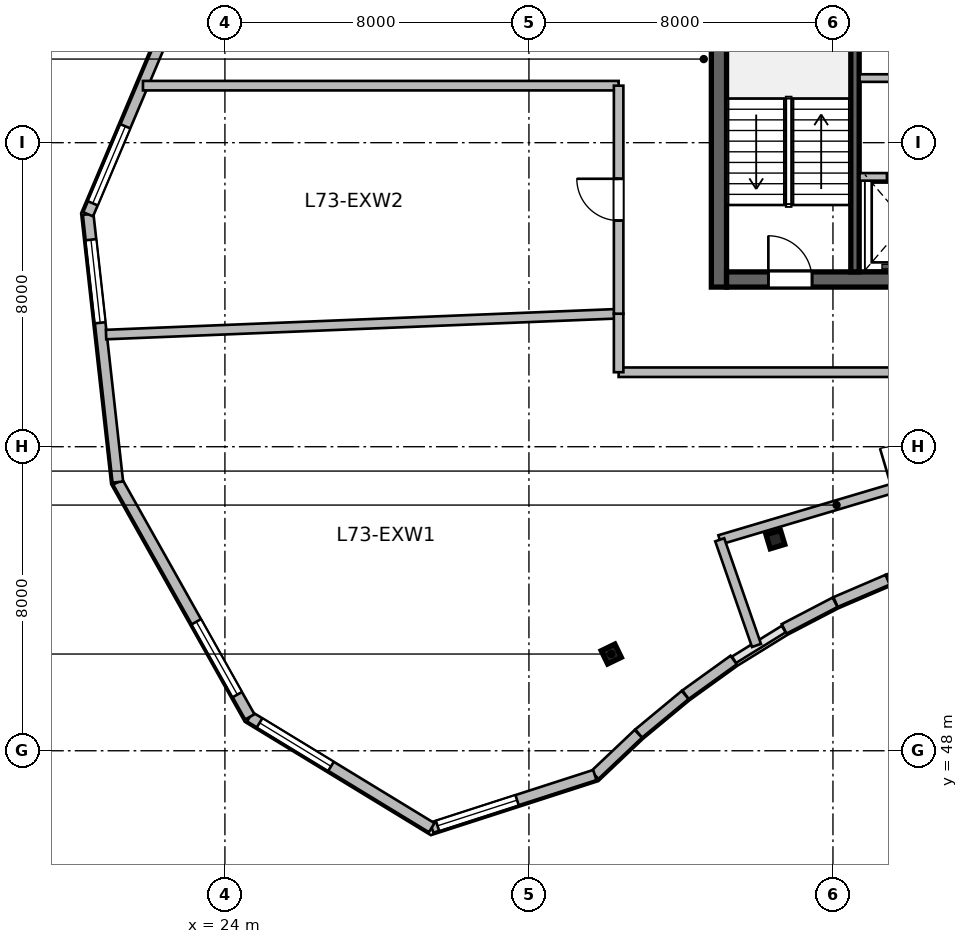
"""IFC4 building model, lengths in metres.
Left out: names, types, materials, properties, quantities, classifications, styles, units other than length and angle.
Written with IfcOpenShell. Run it as: python <this file> out.ifc"""

import sys

from ifc_helpers import new_model, si_unit, direction, frame, frame_2d, origin, origin_2d, place, context, subcontext, project, spatial, rectangle, i_section, extrude, source, transform, mapped, element, fill, save


model = new_model("IFC4")
c1 = context("Model", 3, precision=1e-05, world=origin(), true_north=direction((0.0, 1.0)))
c2 = subcontext(c1, "Body", "Model", "MODEL_VIEW")
j1 = project(units=[si_unit("LENGTHUNIT", "METRE"), si_unit("PLANEANGLEUNIT", "RADIAN")], contexts=[c1])
p1 = place(None, origin())
s1 = spatial("IfcSite", under=j1, at=p1, CompositionType="ELEMENT")
p2 = place(p1, origin())
s2 = spatial("IfcBuilding", under=s1, at=p2, CompositionType="ELEMENT")
p3 = place(p2, frame((0.0, 0.0, 299.1)))
s3 = spatial("IfcBuildingStorey", under=s2, at=p3, CompositionType="ELEMENT", Elevation=299.1)
m1 = source(origin(), c2, "Body", "SweptSolid", [
    extrude(rectangle(XDim=12.0, YDim=0.4, at=frame_2d((6.0, 0.0))), origin(), (0.0, 0.0, 1.0), 3.9),
])
p4 = place(p3, frame((37.0, 60.2, 0.0), z_axis=(0.0, 0.0, 1.0), x_axis=(0.0, 1.0, 0.0)))
e1 = element("IfcWall", 1, at=p4, inside=s3, PredefinedType="SHEAR", context=c2, shape_type="MappedRepresentation", body=[
    mapped(m1, transform((0.0, 0.0, 0.0), scale=1.0)),
])
m2 = source(origin(), c2, "Body", "SweptSolid", [
    extrude(rectangle(XDim=21.6, YDim=0.4, at=frame_2d((10.8, 0.0))), origin(), (0.0, 0.0, 1.0), 3.9),
])
p5 = place(p3, frame((37.2, 60.4, 0.0), z_axis=(0.0, 0.0, 1.0), x_axis=(1.0, 0.0, 0.0)))
e2 = element("IfcWall", 2, at=p5, inside=s3, PredefinedType="SHEAR", context=c2, shape_type="MappedRepresentation", body=[
    mapped(m2, transform((0.0, 0.0, 0.0), scale=1.0)),
])
p6 = place(p5, frame((1.1, 0.0, 0.0)))
e3 = element("IfcOpeningElement", 3, at=p6, cuts=e2, PredefinedType="OPENING", context=c2, shape_type="SweptSolid", body=[
    extrude(rectangle(XDim=1.15, YDim=2.15, at=frame_2d((0.575, 1.075))), frame((0.0, 0.21, 0.0), z_axis=(0.0, -1.0, 0.0), x_axis=(1.0, 0.0, 0.0)), (0.0, 0.0, 1.0), 0.42),
])
p7 = place(p5, frame((19.5, 0.0, 0.0)))
e4 = element("IfcOpeningElement", 4, at=p7, cuts=e2, PredefinedType="OPENING", context=c2, shape_type="SweptSolid", body=[
    extrude(rectangle(XDim=0.9, YDim=2.1, at=frame_2d((0.45, 1.05))), frame((0.0, 0.21, 0.0), z_axis=(0.0, -1.0, 0.0), x_axis=(1.0, 0.0, 0.0)), (0.0, 0.0, 1.0), 0.42),
])
p8 = place(p5, frame((12.02, 0.0, 0.0)))
e5 = element("IfcOpeningElement", 5, at=p8, cuts=e2, PredefinedType="OPENING", context=c2, shape_type="SweptSolid", body=[
    extrude(rectangle(XDim=1.6, YDim=2.15, at=frame_2d((0.8, 1.075))), frame((0.0, 0.21, 0.0), z_axis=(0.0, -1.0, 0.0), x_axis=(1.0, 0.0, 0.0)), (0.0, 0.0, 1.0), 0.42),
])
m3 = source(origin(), c2, "Body", "SweptSolid", [
    extrude(rectangle(XDim=11.2, YDim=0.22, at=frame_2d((5.6, 0.0))), origin(), (0.0, 0.0, 1.0), 3.9),
])
p9 = place(p3, frame((40.58, 60.6, 0.0), z_axis=(0.0, 0.0, 1.0), x_axis=(0.0, 1.0, 0.0)))
e6 = element("IfcWall", 6, at=p9, inside=s3, PredefinedType="SHEAR", context=c2, shape_type="MappedRepresentation", body=[
    mapped(m3, transform((0.0, 0.0, 0.0), scale=1.0)),
])
m4 = source(origin(), c2, "Body", "SweptSolid", [
    extrude(i_section(OverallWidth=0.399, OverallDepth=0.387, WebThickness=0.021, FlangeThickness=0.033, at=origin_2d()), origin(), (0.0, 0.0, 1.0), 3.9),
])
for number, where, z_axis, x_axis in (
    (7, (34.166, 50.545, 0.0), (0.0, 0.0, 1.0), (-0.436, 0.9, 0.0)),
    (8, (38.485, 53.558, 0.0), (0.0, 0.0, 1.0), (-0.289, 0.957, 0.0)),
):
    element("IfcColumn", number, at=place(p3, frame(where, z_axis=z_axis, x_axis=x_axis)), inside=s3, PredefinedType="COLUMN", context=c2, shape_type="MappedRepresentation", body=[
        mapped(m4, transform((0.0, 0.0, 0.0), scale=1.0)),
    ])
m5 = source(origin(), c2, "Body", "SweptSolid", [
    extrude(rectangle(XDim=1.473, YDim=0.28, at=frame_2d((0.736, 0.0))), origin(), (0.0, 0.0, 1.0), 3.64),
])
p10 = place(p3, frame((42.845, 52.979, 0.0), z_axis=(0.0, 0.0, 1.0), x_axis=(-0.946641296917, -0.322289086026, 0.0)))
e9 = element("IfcWall", 9, at=p10, inside=s3, PredefinedType="SOLIDWALL", context=c2, shape_type="MappedRepresentation", body=[
    mapped(m5, transform((0.0, 0.0, 0.0), scale=1.0)),
])
m6 = source(origin(), c2, "Body", "SweptSolid", [
    extrude(rectangle(XDim=1.49, YDim=0.28, at=frame_2d((0.745, 0.0))), origin(), (0.0, 0.0, 1.0), 3.64),
])
p11 = place(p3, frame((41.438, 52.5, 0.0), z_axis=(0.0, 0.0, 1.0), x_axis=(-0.919009427656, -0.394235553799, 0.0)))
e10 = element("IfcWall", 10, at=p11, inside=s3, PredefinedType="SOLIDWALL", context=c2, shape_type="MappedRepresentation", body=[
    mapped(m6, transform((0.0, 0.0, 0.0), scale=1.0)),
])
m7 = source(origin(), c2, "Body", "SweptSolid", [
    extrude(rectangle(XDim=1.512, YDim=0.28, at=frame_2d((0.756, 0.0))), origin(), (0.0, 0.0, 1.0), 3.64),
])
p12 = place(p3, frame((40.056, 51.906, 0.0), z_axis=(0.0, 0.0, 1.0), x_axis=(-0.886841011195, -0.462074691865, 0.0)))
e11 = element("IfcWall", 11, at=p12, inside=s3, PredefinedType="SOLIDWALL", context=c2, shape_type="MappedRepresentation", body=[
    mapped(m7, transform((0.0, 0.0, 0.0), scale=1.0)),
])
m8 = source(origin(), c2, "Body", "SweptSolid", [
    extrude(rectangle(XDim=1.561, YDim=0.28, at=frame_2d((0.781, 0.0))), origin(), (0.0, 0.0, 1.0), 3.64),
])
p13 = place(p3, frame((37.387, 50.387, 0.0), z_axis=(0.0, 0.0, 1.0), x_axis=(-0.81154027425, -0.584296485758, 0.0)))
e12 = element("IfcWall", 12, at=p13, inside=s3, PredefinedType="SOLIDWALL", context=c2, shape_type="MappedRepresentation", body=[
    mapped(m8, transform((0.0, 0.0, 0.0), scale=1.0)),
])
m9 = source(origin(), c2, "Body", "SweptSolid", [
    extrude(rectangle(XDim=1.589, YDim=0.28, at=frame_2d((0.794, 0.0))), origin(), (0.0, 0.0, 1.0), 3.64),
])
p14 = place(p3, frame((36.11, 49.468, 0.0), z_axis=(0.0, 0.0, 1.0), x_axis=(-0.769805836273, -0.63827813251, 0.0)))
e13 = element("IfcWall", 13, at=p14, inside=s3, PredefinedType="SOLIDWALL", context=c2, shape_type="MappedRepresentation", body=[
    mapped(m9, transform((0.0, 0.0, 0.0), scale=1.0)),
])
m10 = source(origin(), c2, "Body", "SweptSolid", [
    extrude(rectangle(XDim=1.577, YDim=0.28, at=frame_2d((0.789, 0.0))), origin(), (0.0, 0.0, 1.0), 3.64),
])
p15 = place(p3, frame((34.878, 48.446, 0.0), z_axis=(0.0, 0.0, 1.0), x_axis=(-0.726119464467, -0.687568558998, 0.0)))
e14 = element("IfcWall", 14, at=p15, inside=s3, PredefinedType="SOLIDWALL", context=c2, shape_type="MappedRepresentation", body=[
    mapped(m10, transform((0.0, 0.0, 0.0), scale=1.0)),
])
m11 = source(origin(), c2, "Body", "SweptSolid", [
    extrude(rectangle(XDim=4.509, YDim=0.28, at=frame_2d((2.255, 0.0))), origin(), (0.0, 0.0, 1.0), 3.64),
])
p16 = place(p3, frame((33.733, 47.361, 0.0), z_axis=(0.0, 0.0, 1.0), x_axis=(-0.95162949292, -0.307247958828, 0.0)))
e15 = element("IfcWall", 15, at=p16, inside=s3, PredefinedType="SOLIDWALL", context=c2, shape_type="MappedRepresentation", body=[
    mapped(m11, transform((0.0, 0.0, 0.0), scale=1.0)),
])
p17 = place(p16, frame((2.149, 0.0, 0.95)))
e16 = element("IfcOpeningElement", 16, at=p17, cuts=e15, PredefinedType="OPENING", context=c2, shape_type="SweptSolid", body=[
    extrude(rectangle(XDim=2.2, YDim=2.1, at=frame_2d((1.1, 1.05))), frame((0.0, 0.15, 0.0), z_axis=(0.0, -1.0, 0.0), x_axis=(1.0, 0.0, 0.0)), (0.0, 0.0, 1.0), 0.3),
])
m12 = source(origin(), c2, "Body", "SweptSolid", [
    extrude(rectangle(XDim=5.604, YDim=0.28, at=frame_2d((2.802, 0.0))), origin(), (0.0, 0.0, 1.0), 3.64),
])
p18 = place(p3, frame((29.442, 45.976, 0.0), z_axis=(0.0, 0.0, 1.0), x_axis=(-0.854002492971, 0.520268913158, 0.0)))
e17 = element("IfcWall", 17, at=p18, inside=s3, PredefinedType="SOLIDWALL", context=c2, shape_type="MappedRepresentation", body=[
    mapped(m12, transform((0.0, 0.0, 0.0), scale=1.0)),
])
p19 = place(p18, frame((3.103, 0.0, 0.95)))
e18 = element("IfcOpeningElement", 18, at=p19, cuts=e17, PredefinedType="OPENING", context=c2, shape_type="SweptSolid", body=[
    extrude(rectangle(XDim=2.2, YDim=2.1, at=frame_2d((1.1, 1.05))), frame((0.0, 0.15, 0.0), z_axis=(0.0, -1.0, 0.0), x_axis=(1.0, 0.0, 0.0)), (0.0, 0.0, 1.0), 0.3),
])
m13 = source(origin(), c2, "Body", "SweptSolid", [
    extrude(rectangle(XDim=7.087, YDim=0.28, at=frame_2d((3.543, 0.0))), origin(), (0.0, 0.0, 1.0), 3.64),
])
p20 = place(p3, frame((24.656, 48.892, 0.0), z_axis=(0.0, 0.0, 1.0), x_axis=(-0.490158199368, 0.871633489256, 0.0)))
e19 = element("IfcWall", 19, at=p20, inside=s3, PredefinedType="SOLIDWALL", context=c2, shape_type="MappedRepresentation", body=[
    mapped(m13, transform((0.0, 0.0, 0.0), scale=1.0)),
])
p21 = place(p20, frame((0.672, 0.0, 0.95)))
e20 = element("IfcOpeningElement", 20, at=p21, cuts=e19, PredefinedType="OPENING", context=c2, shape_type="SweptSolid", body=[
    extrude(rectangle(XDim=2.2, YDim=2.1, at=frame_2d((1.1, 1.05))), frame((0.0, 0.15, 0.0), z_axis=(0.0, -1.0, 0.0), x_axis=(1.0, 0.0, 0.0)), (0.0, 0.0, 1.0), 0.3),
])
m14 = source(origin(), c2, "Body", "SweptSolid", [
    extrude(rectangle(XDim=7.09, YDim=0.28, at=frame_2d((3.545, 0.0))), origin(), (0.0, 0.0, 1.0), 3.64),
])
p22 = place(p3, frame((21.182, 55.069, 0.0), z_axis=(0.0, 0.0, 1.0), x_axis=(-0.110159396922, 0.993913933532, 0.0)))
e21 = element("IfcWall", 21, at=p22, inside=s3, PredefinedType="SOLIDWALL", context=c2, shape_type="MappedRepresentation", body=[
    mapped(m14, transform((0.0, 0.0, 0.0), scale=1.0)),
])
p23 = place(p22, frame((4.217, 0.0, 0.95)))
e22 = element("IfcOpeningElement", 22, at=p23, cuts=e21, PredefinedType="OPENING", context=c2, shape_type="SweptSolid", body=[
    extrude(rectangle(XDim=2.2, YDim=2.1, at=frame_2d((1.1, 1.05))), frame((0.0, 0.15, 0.0), z_axis=(0.0, -1.0, 0.0), x_axis=(1.0, 0.0, 0.0)), (0.0, 0.0, 1.0), 0.3),
])
m15 = source(origin(), c2, "Body", "SweptSolid", [
    extrude(rectangle(XDim=5.655, YDim=0.28, at=frame_2d((2.828, 0.0))), origin(), (0.0, 0.0, 1.0), 3.64),
])
p24 = place(p3, frame((20.401, 62.116, 0.0), z_axis=(0.0, 0.0, 1.0), x_axis=(0.389585063528, 0.920990487614, 0.0)))
e23 = element("IfcWall", 23, at=p24, inside=s3, PredefinedType="SOLIDWALL", context=c2, shape_type="MappedRepresentation", body=[
    mapped(m15, transform((0.0, 0.0, 0.0), scale=1.0)),
])
p25 = place(p24, frame((0.314, 0.0, 0.95)))
e24 = element("IfcOpeningElement", 24, at=p25, cuts=e23, PredefinedType="OPENING", context=c2, shape_type="SweptSolid", body=[
    extrude(rectangle(XDim=2.2, YDim=2.1, at=frame_2d((1.1, 1.05))), frame((0.0, 0.15, 0.0), z_axis=(0.0, -1.0, 0.0), x_axis=(1.0, 0.0, 0.0)), (0.0, 0.0, 1.0), 0.3),
])
m16 = source(origin(), c2, "Body", "SweptSolid", [
    extrude(rectangle(XDim=8.02, YDim=0.2, at=frame_2d((4.01, 0.0))), origin(), (0.0, 0.0, 1.0), 3.64),
])
p26 = place(p3, frame((40.7, 63.1, 0.0), z_axis=(0.0, 0.0, 1.0), x_axis=(1.0, 0.0, 0.0)))
e25 = element("IfcWall", 25, at=p26, inside=s3, PredefinedType="SOLIDWALL", context=c2, shape_type="MappedRepresentation", body=[
    mapped(m16, transform((0.0, 0.0, 0.0), scale=1.0)),
])
p27 = place(p26, frame((0.72, 0.0, 0.0)))
e26 = element("IfcOpeningElement", 26, at=p27, cuts=e25, PredefinedType="OPENING", context=c2, shape_type="SweptSolid", body=[
    extrude(rectangle(XDim=1.0, YDim=2.15, at=frame_2d((0.5, 1.075))), frame((0.0, 0.11, 0.0), z_axis=(0.0, -1.0, 0.0), x_axis=(1.0, 0.0, 0.0)), (0.0, 0.0, 1.0), 0.22),
])
p28 = place(p26, frame((2.62, 0.0, 0.0)))
e27 = element("IfcOpeningElement", 27, at=p28, cuts=e25, PredefinedType="OPENING", context=c2, shape_type="SweptSolid", body=[
    extrude(rectangle(XDim=1.0, YDim=2.15, at=frame_2d((0.5, 1.075))), frame((0.0, 0.11, 0.0), z_axis=(0.0, -1.0, 0.0), x_axis=(1.0, 0.0, 0.0)), (0.0, 0.0, 1.0), 0.22),
])
p29 = place(p26, frame((4.55, 0.0, 0.0)))
e28 = element("IfcOpeningElement", 28, at=p29, cuts=e25, PredefinedType="OPENING", context=c2, shape_type="SweptSolid", body=[
    extrude(rectangle(XDim=1.0, YDim=2.15, at=frame_2d((0.5, 1.075))), frame((0.0, 0.11, 0.0), z_axis=(0.0, -1.0, 0.0), x_axis=(1.0, 0.0, 0.0)), (0.0, 0.0, 1.0), 0.22),
])
p30 = place(p26, frame((6.55, 0.0, 0.0)))
e29 = element("IfcOpeningElement", 29, at=p30, cuts=e25, PredefinedType="OPENING", context=c2, shape_type="SweptSolid", body=[
    extrude(rectangle(XDim=1.0, YDim=2.15, at=frame_2d((0.5, 1.075))), frame((0.0, 0.11, 0.0), z_axis=(0.0, -1.0, 0.0), x_axis=(1.0, 0.0, 0.0)), (0.0, 0.0, 1.0), 0.22),
])
m17 = source(origin(), c2, "Body", "SweptSolid", [
    extrude(rectangle(XDim=8.8, YDim=0.2, at=frame_2d((4.4, 0.0))), origin(), (0.0, 0.0, 1.0), 3.64),
])
p31 = place(p3, frame((40.7, 65.7, 0.0), z_axis=(0.0, 0.0, 1.0), x_axis=(1.0, 0.0, 0.0)))
e30 = element("IfcWall", 30, at=p31, inside=s3, PredefinedType="SOLIDWALL", context=c2, shape_type="MappedRepresentation", body=[
    mapped(m17, transform((0.0, 0.0, 0.0), scale=1.0)),
])
p32 = place(p31, frame((1.6, 0.0, 0.0)))
e31 = element("IfcOpeningElement", 31, at=p32, cuts=e30, PredefinedType="OPENING", context=c2, shape_type="SweptSolid", body=[
    extrude(rectangle(XDim=0.9, YDim=2.1, at=frame_2d((0.45, 1.05))), frame((0.0, 0.11, 0.0), z_axis=(0.0, -1.0, 0.0), x_axis=(1.0, 0.0, 0.0)), (0.0, 0.0, 1.0), 0.22),
])
p33 = place(p31, frame((6.1, 0.0, 0.0)))
e32 = element("IfcOpeningElement", 32, at=p33, cuts=e30, PredefinedType="OPENING", context=c2, shape_type="SweptSolid", body=[
    extrude(rectangle(XDim=0.9, YDim=2.1, at=frame_2d((0.45, 1.05))), frame((0.0, 0.11, 0.0), z_axis=(0.0, -1.0, 0.0), x_axis=(1.0, 0.0, 0.0)), (0.0, 0.0, 1.0), 0.22),
])
m18 = source(origin(), c2, "Body", "SweptSolid", [
    extrude(rectangle(XDim=11.454, YDim=0.25, at=frame_2d((5.727, 0.0))), origin(), (0.0, 0.0, 1.0), 3.314),
])
p34 = place(p3, frame((37.021, 53.552, 0.0), z_axis=(0.0, 0.0, 1.0), x_axis=(0.958594874645, 0.284773359541, 0.0)))
e33 = element("IfcWall", 33, at=p34, inside=s3, PredefinedType="PARTITIONING", context=c2, shape_type="MappedRepresentation", body=[
    mapped(m18, transform((0.0, 0.0, 0.0), scale=1.0)),
])
p35 = place(p34, frame((4.727, 0.0, 0.0)))
e34 = element("IfcOpeningElement", 34, at=p35, cuts=e33, PredefinedType="OPENING", context=c2, shape_type="SweptSolid", body=[
    extrude(rectangle(XDim=1.1, YDim=2.15, at=frame_2d((0.55, 1.075))), frame((0.0, 0.135, 0.0), z_axis=(0.0, -1.0, 0.0), x_axis=(1.0, 0.0, 0.0)), (0.0, 0.0, 1.0), 0.27),
])
m19 = source(origin(), c2, "Body", "SweptSolid", [
    extrude(rectangle(XDim=2.944, YDim=0.25, at=frame_2d((1.472, 0.0))), origin(), (0.0, 0.0, 1.0), 3.64),
])
p36 = place(p3, frame((37.988, 50.771, 0.0), z_axis=(0.0, 0.0, 1.0), x_axis=(-0.328565655286, 0.944481132774, 0.0)))
e35 = element("IfcWall", 35, at=p36, inside=s3, PredefinedType="PARTITIONING", context=c2, shape_type="MappedRepresentation", body=[
    mapped(m19, transform((0.0, 0.0, 0.0), scale=1.0)),
])
m20 = source(origin(), c2, "Body", "SweptSolid", [
    extrude(rectangle(XDim=12.39, YDim=0.25, at=frame_2d((6.195, 0.0))), origin(), (0.0, 0.0, 1.0), 3.64),
])
p37 = place(p3, frame((34.36, 57.96, 0.0), z_axis=(0.0, 0.0, 1.0), x_axis=(1.0, 0.0, 0.0)))
e36 = element("IfcWall", 36, at=p37, inside=s3, PredefinedType="PARTITIONING", context=c2, shape_type="MappedRepresentation", body=[
    mapped(m20, transform((0.0, 0.0, 0.0), scale=1.0)),
])
m21 = source(origin(), c2, "Body", "SweptSolid", [
    extrude(rectangle(XDim=13.499, YDim=0.25, at=frame_2d((6.75, 0.0))), origin(), (0.0, 0.0, 1.0), 3.64),
])
p38 = place(p3, frame((20.872, 58.951, 0.0), z_axis=(0.0, 0.0, 1.0), x_axis=(0.999172424054, 0.04067513995, 0.0)))
e37 = element("IfcWall", 37, at=p38, inside=s3, PredefinedType="PARTITIONING", context=c2, shape_type="MappedRepresentation", body=[
    mapped(m21, transform((0.0, 0.0, 0.0), scale=1.0)),
])
m22 = source(origin(), c2, "Body", "SweptSolid", [
    extrude(rectangle(XDim=1.54, YDim=0.25, at=frame_2d((0.77, 0.0))), origin(), (0.0, 0.0, 1.0), 3.64),
])
p39 = place(p3, frame((34.36, 57.96, 0.0), z_axis=(0.0, 0.0, 1.0), x_axis=(0.0, 1.0, 0.0)))
e38 = element("IfcWall", 38, at=p39, inside=s3, PredefinedType="PARTITIONING", context=c2, shape_type="MappedRepresentation", body=[
    mapped(m22, transform((0.0, 0.0, 0.0), scale=1.0)),
])
m23 = source(origin(), c2, "Body", "SweptSolid", [
    extrude(rectangle(XDim=12.517, YDim=0.25, at=frame_2d((6.258, 0.0))), origin(), (0.0, 0.0, 1.0), 3.64),
])
p40 = place(p3, frame((21.844, 65.5, 0.0), z_axis=(0.0, 0.0, 1.0), x_axis=(1.0, 0.0, 0.0)))
e39 = element("IfcWall", 39, at=p40, inside=s3, PredefinedType="PARTITIONING", context=c2, shape_type="MappedRepresentation", body=[
    mapped(m23, transform((0.0, 0.0, 0.0), scale=1.0)),
])
m24 = source(origin(), c2, "Body", "SweptSolid", [
    extrude(rectangle(XDim=6.0, YDim=0.25, at=frame_2d((3.0, 0.0))), origin(), (0.0, 0.0, 1.0), 3.64),
])
p41 = place(p3, frame((34.36, 59.5, 0.0), z_axis=(0.0, 0.0, 1.0), x_axis=(0.0, 1.0, 0.0)))
e40 = element("IfcWall", 40, at=p41, inside=s3, PredefinedType="PARTITIONING", context=c2, shape_type="MappedRepresentation", body=[
    mapped(m24, transform((0.0, 0.0, 0.0), scale=1.0)),
])
p42 = place(p41, frame((2.45, 0.0, 0.0)))
e41 = element("IfcOpeningElement", 41, at=p42, cuts=e40, PredefinedType="OPENING", context=c2, shape_type="SweptSolid", body=[
    extrude(rectangle(XDim=1.1, YDim=2.15, at=frame_2d((0.55, 1.075))), frame((0.0, 0.135, 0.0), z_axis=(0.0, -1.0, 0.0), x_axis=(1.0, 0.0, 0.0)), (0.0, 0.0, 1.0), 0.27),
])
m25 = source(origin(), c2, "Body", "SweptSolid", [
    extrude(rectangle(XDim=2.2, YDim=2.1, at=frame_2d((1.1, 1.05))), frame((0.0, 0.03, 0.0), z_axis=(0.0, -1.0, 0.0), x_axis=(1.0, 0.0, 0.0)), (0.0, 0.0, 1.0), 0.06),
])
p43 = place(p17, origin())
e42 = element("IfcWindow", 42, at=p43, inside=s3, PartitioningType="TRIPLE_PANEL_VERTICAL", PredefinedType="WINDOW", context=c2, shape_type="MappedRepresentation", body=[
    mapped(m25, transform((0.0, 0.0, 0.0), scale=1.0)),
])
fill(e16, e42)
p44 = place(p19, origin())
e43 = element("IfcWindow", 43, at=p44, inside=s3, PartitioningType="TRIPLE_PANEL_VERTICAL", PredefinedType="WINDOW", context=c2, shape_type="MappedRepresentation", body=[
    mapped(m25, transform((0.0, 0.0, 0.0), scale=1.0)),
])
fill(e18, e43)
p45 = place(p21, origin())
e44 = element("IfcWindow", 44, at=p45, inside=s3, PartitioningType="TRIPLE_PANEL_VERTICAL", PredefinedType="WINDOW", context=c2, shape_type="MappedRepresentation", body=[
    mapped(m25, transform((0.0, 0.0, 0.0), scale=1.0)),
])
fill(e20, e44)
p46 = place(p23, origin())
e45 = element("IfcWindow", 45, at=p46, inside=s3, PartitioningType="TRIPLE_PANEL_VERTICAL", PredefinedType="WINDOW", context=c2, shape_type="MappedRepresentation", body=[
    mapped(m25, transform((0.0, 0.0, 0.0), scale=1.0)),
])
fill(e22, e45)
p47 = place(p25, origin())
e46 = element("IfcWindow", 46, at=p47, inside=s3, PartitioningType="TRIPLE_PANEL_VERTICAL", PredefinedType="WINDOW", context=c2, shape_type="MappedRepresentation", body=[
    mapped(m25, transform((0.0, 0.0, 0.0), scale=1.0)),
])
fill(e24, e46)
m26 = source(origin(), c2, "Body", "SweptSolid", [
    extrude(rectangle(XDim=1.15, YDim=2.15, at=frame_2d((0.575, 1.075))), frame((0.0, 0.025, 0.0), z_axis=(0.0, -1.0, 0.0), x_axis=(1.0, 0.0, 0.0)), (0.0, 0.0, 1.0), 0.05),
])
p48 = place(p6, origin())
e47 = element("IfcDoor", 47, at=p48, inside=s3, OperationType="SINGLE_SWING_LEFT", PredefinedType="DOOR", context=c2, shape_type="MappedRepresentation", body=[
    mapped(m26, transform((0.0, 0.0, 0.0), scale=1.0)),
])
fill(e3, e47)
m27 = source(origin(), c2, "Body", "SweptSolid", [
    extrude(rectangle(XDim=1.0, YDim=2.15, at=frame_2d((0.5, 1.075))), frame((0.0, 0.025, 0.0), z_axis=(0.0, -1.0, 0.0), x_axis=(1.0, 0.0, 0.0)), (0.0, 0.0, 1.0), 0.05),
])
p49 = place(p27, origin())
e48 = element("IfcDoor", 48, at=p49, inside=s3, OperationType="DOUBLE_DOOR_SLIDING", PredefinedType="DOOR", context=c2, shape_type="MappedRepresentation", body=[
    mapped(m27, transform((0.0, 0.0, 0.0), scale=1.0)),
])
fill(e26, e48)
m28 = source(origin(), c2, "Body", "SweptSolid", [
    extrude(rectangle(XDim=1.1, YDim=2.15, at=frame_2d((0.55, 1.075))), frame((0.0, 0.025, 0.0), z_axis=(0.0, -1.0, 0.0), x_axis=(1.0, 0.0, 0.0)), (0.0, 0.0, 1.0), 0.05),
])
p50 = place(p42, origin())
e49 = element("IfcDoor", 49, at=p50, inside=s3, OperationType="SINGLE_SWING_RIGHT", PredefinedType="DOOR", context=c2, shape_type="MappedRepresentation", body=[
    mapped(m28, transform((0.0, 0.0, 0.0), scale=1.0)),
])
fill(e41, e49)
save(model, sys.argv[1])
